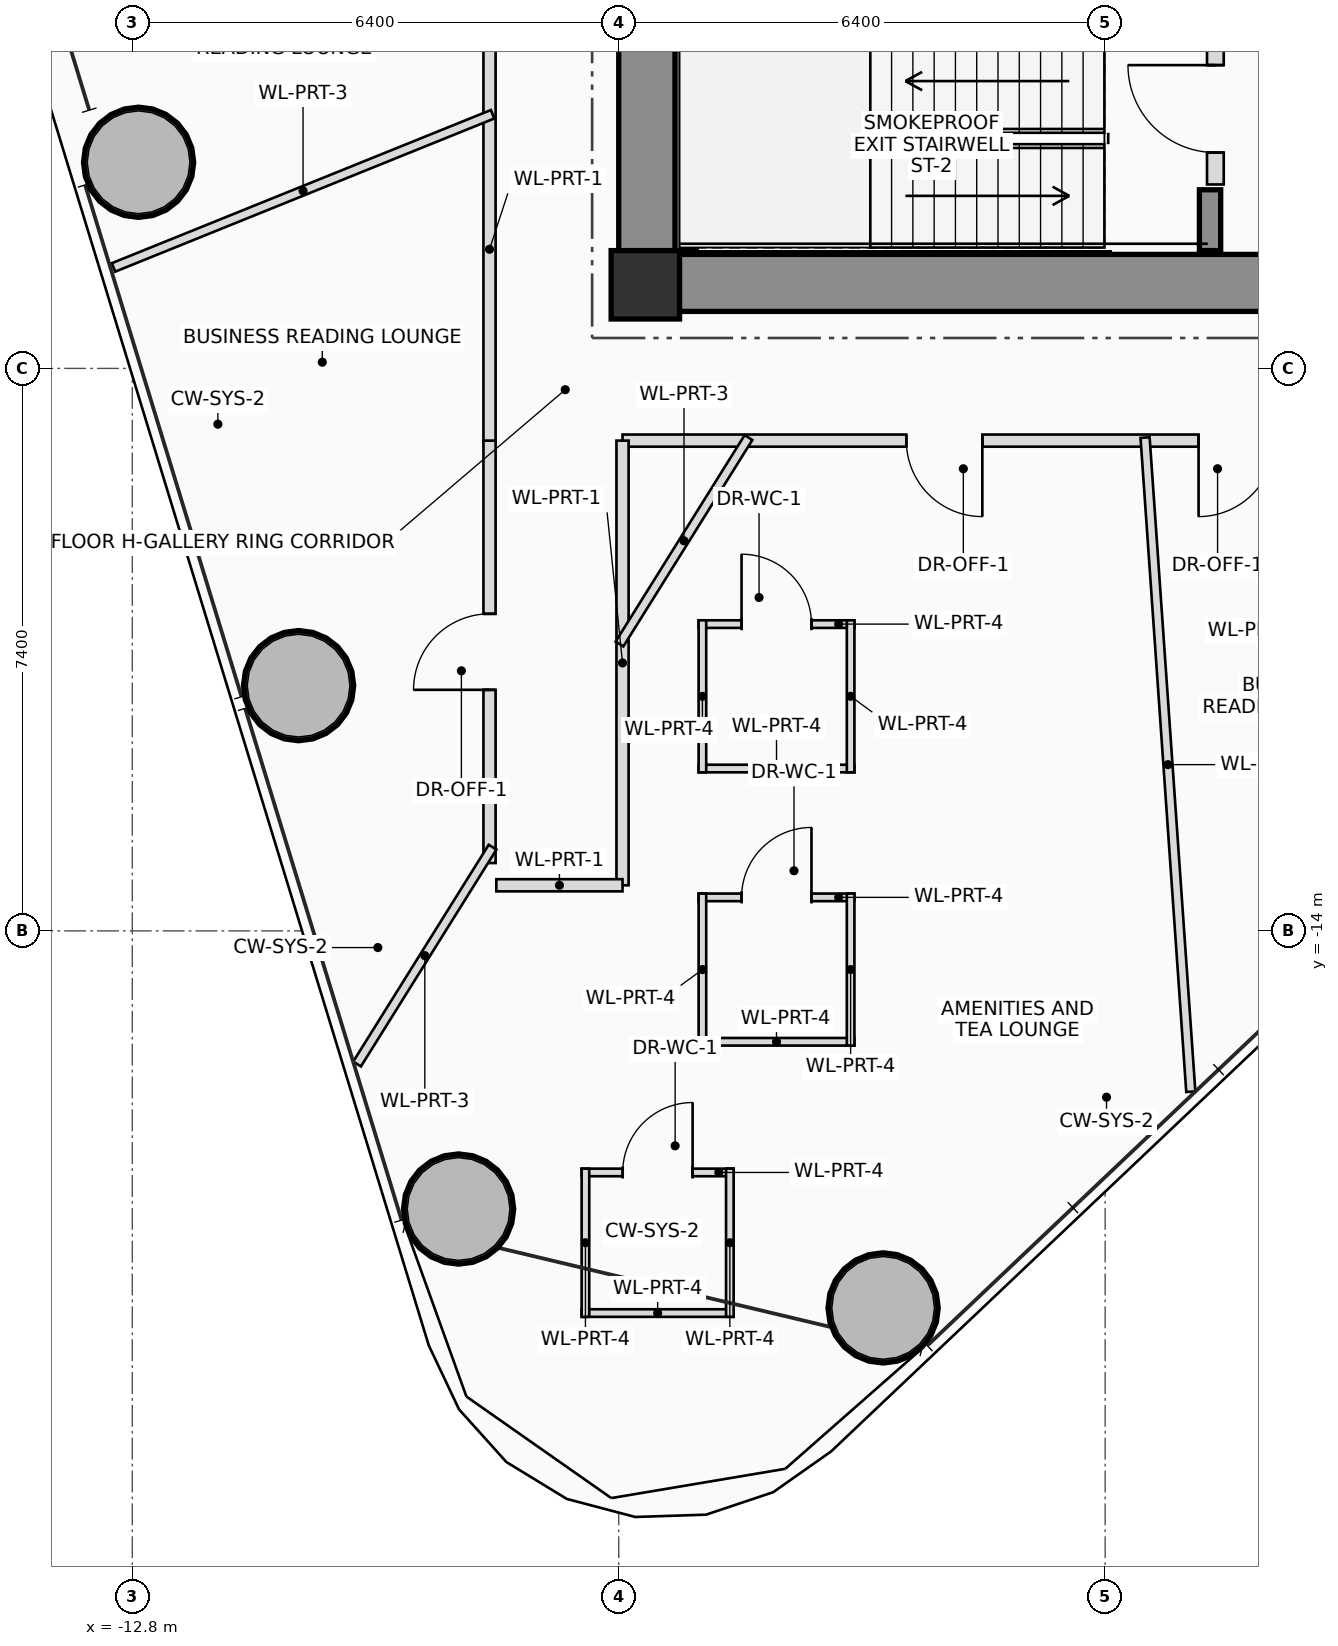
"""IFC4 building model, lengths in metres.
Left out: names, types, materials, properties, quantities, classifications, styles, units other than length and angle.
Written with IfcOpenShell. Run it as: python <this file> out.ifc"""

import sys

from ifc_helpers import new_model, si_unit, direction, frame, frame_2d, origin, origin_2d, place, context, subcontext, project, spatial, rectangle, hollow_circle, extrude, source, transform, mapped, element, fill, save


model = new_model("IFC4")
c1 = context("Model", 3, precision=1e-05, world=origin(), true_north=direction((0.0, 1.0)))
c2 = subcontext(c1, "Body", "Model", "MODEL_VIEW")
j1 = project(units=[si_unit("LENGTHUNIT", "METRE"), si_unit("PLANEANGLEUNIT", "RADIAN")], contexts=[c1])
p1 = place(None, origin())
s1 = spatial("IfcSite", under=j1, at=p1, CompositionType="ELEMENT")
p2 = place(p1, origin())
s2 = spatial("IfcBuilding", under=s1, at=p2, CompositionType="ELEMENT")
p3 = place(p2, frame((0.0, 0.0, 101.15)))
s3 = spatial("IfcBuildingStorey", under=s2, at=p3, CompositionType="ELEMENT", Elevation=101.15)
m1 = source(origin(), c2, "Body", "SweptSolid", [
    extrude(rectangle(XDim=0.9, YDim=0.9, at=origin_2d()), origin(), (0.0, 0.0, 1.0), 3.75),
])
p4 = place(p3, frame((-6.05, -5.5, 0.0), z_axis=(0.0, 0.0, 1.0), x_axis=(1.0, 0.0, 0.0)))
e1 = element("IfcColumn", 1, at=p4, inside=s3, PredefinedType="COLUMN", context=c2, shape_type="MappedRepresentation", body=[
    mapped(m1, transform((0.0, 0.0, 0.0), scale=1.0)),
])
p5 = place(p3, frame((-6.4, -5.475, 0.0), z_axis=(0.0, 0.0, 1.0), x_axis=(1.0, 0.0, 0.0)))
e2 = element("IfcWall", 2, at=p5, inside=s3, PredefinedType="SHEAR", context=c2, shape_type="SweptSolid", body=[
    extrude(rectangle(XDim=12.8, YDim=0.75, at=frame_2d((6.4, 0.0))), origin(), (0.0, 0.0, 1.0), 3.75),
])
p6 = place(p5, frame((8.6, 0.0, 0.0)))
e3 = element("IfcOpeningElement", 3, at=p6, cuts=e2, PredefinedType="OPENING", context=c2, shape_type="SweptSolid", body=[
    extrude(rectangle(XDim=1.2, YDim=2.2, at=frame_2d((0.6, 1.1))), frame((0.0, 0.385, 0.0), z_axis=(0.0, -1.0, 0.0), x_axis=(1.0, 0.0, 0.0)), (0.0, 0.0, 1.0), 0.77),
])
p7 = place(p3, frame((-6.025, -5.1, 0.0), z_axis=(0.0, 0.0, 1.0), x_axis=(0.0, 1.0, 0.0)))
e4 = element("IfcWall", 4, at=p7, inside=s3, PredefinedType="SHEAR", context=c2, shape_type="SweptSolid", body=[
    extrude(rectangle(XDim=3.35, YDim=0.75, at=frame_2d((1.675, 0.0))), origin(), (0.0, 0.0, 1.0), 3.75),
])
p8 = place(p3, frame((-5.52, -5.05, 0.0), z_axis=(0.0, 0.0, 1.0), x_axis=(0.0, 1.0, 0.0)))
e5 = element("IfcWall", 5, at=p8, inside=s3, PredefinedType="SHEAR", context=c2, shape_type="SweptSolid", body=[
    extrude(rectangle(XDim=2.75, YDim=0.28, at=frame_2d((1.375, 0.0))), origin(), (0.0, 0.0, 1.0), 3.75),
])
p9 = place(p3, frame((1.38, -5.05, 0.0), z_axis=(0.0, 0.0, 1.0), x_axis=(0.0, 1.0, 0.0)))
e6 = element("IfcWall", 6, at=p9, inside=s3, PredefinedType="SHEAR", context=c2, shape_type="SweptSolid", body=[
    extrude(rectangle(XDim=0.8, YDim=0.28, at=frame_2d((0.4, 0.0))), origin(), (0.0, 0.0, 1.0), 3.75),
])
m2 = source(origin(), c2, "Body", "SweptSolid", [
    extrude(hollow_circle(Radius=0.725, WallThickness=0.05, at=origin_2d()), origin(), (0.0, 0.0, 1.0), 3.75),
])
for number, where, z_axis, x_axis in (
    (7, (-2.921, -18.96, 0.0), (0.0, 0.0, 1.0), (1.0, 0.0, 0.0)),
    (8, (-12.717, -3.888, 0.0), (0.0, 0.0, 1.0), (1.0, 0.0, 0.0)),
    (9, (-10.612, -10.774, 0.0), (0.0, 0.0, 1.0), (1.0, 0.0, 0.0)),
    (10, (-8.507, -17.659, 0.0), (0.0, 0.0, 1.0), (1.0, 0.0, 0.0)),
):
    element("IfcColumn", number, at=place(p3, frame(where, z_axis=z_axis, x_axis=x_axis)), inside=s3, PredefinedType="COLUMN", context=c2, shape_type="MappedRepresentation", body=[
        mapped(m2, transform((0.0, 0.0, 0.0), scale=1.0)),
    ])
p10 = place(p3, frame((1.45, -4.18, 0.0), z_axis=(0.0, 0.0, 1.0), x_axis=(0.0, 1.0, 0.0)))
e11 = element("IfcWall", 11, at=p10, inside=s3, PredefinedType="PLUMBINGWALL", context=c2, shape_type="SweptSolid", body=[
    extrude(rectangle(XDim=1.98, YDim=0.22, at=frame_2d((0.99, 0.0))), origin(), (0.0, 0.0, 1.0), 3.545),
])
p11 = place(p10, frame((0.42, 0.0, 0.0)))
e12 = element("IfcOpeningElement", 12, at=p11, cuts=e11, PredefinedType="OPENING", context=c2, shape_type="SweptSolid", body=[
    extrude(rectangle(XDim=1.15, YDim=2.15, at=frame_2d((0.575, 1.075))), frame((0.0, 0.12, 0.0), z_axis=(0.0, -1.0, 0.0), x_axis=(1.0, 0.0, 0.0)), (0.0, 0.0, 1.0), 0.24),
])
p12 = place(p3, frame((-5.349, -13.559, 0.0), z_axis=(0.0, 0.0, 1.0), x_axis=(1.0, 0.0, 0.0)))
e13 = element("IfcWall", 13, at=p12, inside=s3, PredefinedType="PARTITIONING", context=c2, shape_type="SweptSolid", body=[
    extrude(rectangle(XDim=2.05, YDim=0.1, at=frame_2d((1.025, 0.0))), origin(), (0.0, 0.0, 1.0), 2.85),
])
p13 = place(p12, frame((0.565, 0.0, 0.0)))
e14 = element("IfcOpeningElement", 14, at=p13, cuts=e13, PredefinedType="OPENING", context=c2, shape_type="SweptSolid", body=[
    extrude(rectangle(XDim=0.92, YDim=2.1, at=frame_2d((0.46, 1.05))), frame((0.0, 0.06, 0.0), z_axis=(0.0, -1.0, 0.0), x_axis=(1.0, 0.0, 0.0)), (0.0, 0.0, 1.0), 0.12),
])
p14 = place(p3, frame((-3.299, -15.459, 0.0), z_axis=(0.0, 0.0, 1.0), x_axis=(-1.0, 0.0, 0.0)))
e15 = element("IfcWall", 15, at=p14, inside=s3, PredefinedType="PARTITIONING", context=c2, shape_type="SweptSolid", body=[
    extrude(rectangle(XDim=2.05, YDim=0.1, at=frame_2d((1.025, 0.0))), origin(), (0.0, 0.0, 1.0), 2.85),
])
for number, where, z_axis, x_axis in (
    (16, (-3.349, -13.509, 0.0), (0.0, 0.0, 1.0), (0.0, -1.0, 0.0)),
    (17, (-5.299, -15.509, 0.0), (0.0, 0.0, 1.0), (0.0, 1.0, 0.0)),
):
    element("IfcWall", number, at=place(p3, frame(where, z_axis=z_axis, x_axis=x_axis)), inside=s3, PredefinedType="PARTITIONING", context=c2, shape_type="SweptSolid", body=[
        extrude(rectangle(XDim=2.0, YDim=0.1, at=frame_2d((1.0, 0.0))), origin(), (0.0, 0.0, 1.0), 3.2),
    ])
p15 = place(p3, frame((-5.349, -9.964, 0.0), z_axis=(0.0, 0.0, 1.0), x_axis=(1.0, 0.0, 0.0)))
e18 = element("IfcWall", 18, at=p15, inside=s3, PredefinedType="PARTITIONING", context=c2, shape_type="SweptSolid", body=[
    extrude(rectangle(XDim=2.05, YDim=0.1, at=frame_2d((1.025, 0.0))), origin(), (0.0, 0.0, 1.0), 2.85),
])
p16 = place(p15, frame((0.565, 0.0, 0.0)))
e19 = element("IfcOpeningElement", 19, at=p16, cuts=e18, PredefinedType="OPENING", context=c2, shape_type="SweptSolid", body=[
    extrude(rectangle(XDim=0.92, YDim=2.1, at=frame_2d((0.46, 1.05))), frame((0.0, 0.06, 0.0), z_axis=(0.0, -1.0, 0.0), x_axis=(1.0, 0.0, 0.0)), (0.0, 0.0, 1.0), 0.12),
])
p17 = place(p3, frame((-3.299, -11.864, 0.0), z_axis=(0.0, 0.0, 1.0), x_axis=(-1.0, 0.0, 0.0)))
e20 = element("IfcWall", 20, at=p17, inside=s3, PredefinedType="PARTITIONING", context=c2, shape_type="SweptSolid", body=[
    extrude(rectangle(XDim=2.05, YDim=0.1, at=frame_2d((1.025, 0.0))), origin(), (0.0, 0.0, 1.0), 2.85),
])
for number, where, z_axis, x_axis in (
    (21, (-3.349, -9.914, 0.0), (0.0, 0.0, 1.0), (0.0, -1.0, 0.0)),
    (22, (-5.299, -11.914, 0.0), (0.0, 0.0, 1.0), (0.0, 1.0, 0.0)),
):
    element("IfcWall", number, at=place(p3, frame(where, z_axis=z_axis, x_axis=x_axis)), inside=s3, PredefinedType="PARTITIONING", context=c2, shape_type="SweptSolid", body=[
        extrude(rectangle(XDim=2.0, YDim=0.1, at=frame_2d((1.0, 0.0))), origin(), (0.0, 0.0, 1.0), 3.2),
    ])
p18 = place(p3, frame((-6.888, -17.178, 0.0), z_axis=(0.0, 0.0, 1.0), x_axis=(1.0, 0.0, 0.0)))
e23 = element("IfcWall", 23, at=p18, inside=s3, PredefinedType="PARTITIONING", context=c2, shape_type="SweptSolid", body=[
    extrude(rectangle(XDim=2.0, YDim=0.1, at=frame_2d((1.0, 0.0))), origin(), (0.0, 0.0, 1.0), 3.545),
])
p19 = place(p18, frame((0.54, 0.0, 0.0)))
e24 = element("IfcOpeningElement", 24, at=p19, cuts=e23, PredefinedType="OPENING", context=c2, shape_type="SweptSolid", body=[
    extrude(rectangle(XDim=0.92, YDim=2.1, at=frame_2d((0.46, 1.05))), frame((0.0, 0.06, 0.0), z_axis=(0.0, -1.0, 0.0), x_axis=(1.0, 0.0, 0.0)), (0.0, 0.0, 1.0), 0.12),
])
p20 = place(p3, frame((-4.888, -19.028, 0.0), z_axis=(0.0, 0.0, 1.0), x_axis=(-1.0, 0.0, 0.0)))
e25 = element("IfcWall", 25, at=p20, inside=s3, PredefinedType="PARTITIONING", context=c2, shape_type="SweptSolid", body=[
    extrude(rectangle(XDim=2.0, YDim=0.1, at=frame_2d((1.0, 0.0))), origin(), (0.0, 0.0, 1.0), 3.545),
])
for number, where, z_axis, x_axis in (
    (26, (-4.938, -17.128, 0.0), (0.0, 0.0, 1.0), (0.0, -1.0, 0.0)),
    (27, (-6.838, -19.078, 0.0), (0.0, 0.0, 1.0), (0.0, 1.0, 0.0)),
):
    element("IfcWall", number, at=place(p3, frame(where, z_axis=z_axis, x_axis=x_axis)), inside=s3, PredefinedType="PARTITIONING", context=c2, shape_type="SweptSolid", body=[
        extrude(rectangle(XDim=1.95, YDim=0.1, at=frame_2d((0.975, 0.0))), origin(), (0.0, 0.0, 1.0), 3.01),
    ])
p21 = place(p3, frame((-8.1, -13.107, 0.0), z_axis=(0.0, 0.0, 1.0), x_axis=(0.0, 1.0, 0.0)))
e28 = element("IfcWall", 28, at=p21, inside=s3, PredefinedType="PARTITIONING", context=c2, shape_type="SweptSolid", body=[
    extrude(rectangle(XDim=5.557, YDim=0.16, at=frame_2d((2.779, 0.0))), origin(), (0.0, 0.0, 1.0), 2.85),
])
p22 = place(p21, frame((2.279, 0.0, 0.0)))
e29 = element("IfcOpeningElement", 29, at=p22, cuts=e28, PredefinedType="OPENING", context=c2, shape_type="SweptSolid", body=[
    extrude(rectangle(XDim=1.0, YDim=2.25, at=frame_2d((0.5, 1.125))), frame((0.0, 0.09, 0.0), z_axis=(0.0, -1.0, 0.0), x_axis=(1.0, 0.0, 0.0)), (0.0, 0.0, 1.0), 0.18),
])
p23 = place(p3, frame((-8.1, -7.55, 0.0), z_axis=(0.0, 0.0, 1.0), x_axis=(0.0, 1.0, 0.0)))
e30 = element("IfcWall", 30, at=p23, inside=s3, PredefinedType="PARTITIONING", context=c2, shape_type="SweptSolid", body=[
    extrude(rectangle(XDim=15.1, YDim=0.16, at=frame_2d((7.55, 0.0))), origin(), (0.0, 0.0, 1.0), 2.85),
])
p24 = place(p23, frame((5.185, 0.0, 0.0)))
e31 = element("IfcOpeningElement", 31, at=p24, cuts=e30, PredefinedType="OPENING", context=c2, shape_type="SweptSolid", body=[
    extrude(rectangle(XDim=1.0, YDim=2.25, at=frame_2d((0.5, 1.125))), frame((0.0, 0.09, 0.0), z_axis=(0.0, -1.0, 0.0), x_axis=(1.0, 0.0, 0.0)), (0.0, 0.0, 1.0), 0.18),
])
p25 = place(p23, frame((9.39, 0.0, 0.0)))
e32 = element("IfcOpeningElement", 32, at=p25, cuts=e30, PredefinedType="OPENING", context=c2, shape_type="SweptSolid", body=[
    extrude(rectangle(XDim=1.0, YDim=2.25, at=frame_2d((0.5, 1.125))), frame((0.0, 0.09, 0.0), z_axis=(0.0, -1.0, 0.0), x_axis=(1.0, 0.0, 0.0)), (0.0, 0.0, 1.0), 0.18),
])
p26 = place(p23, frame((13.607, 0.0, 0.0)))
e33 = element("IfcOpeningElement", 33, at=p26, cuts=e30, PredefinedType="OPENING", context=c2, shape_type="SweptSolid", body=[
    extrude(rectangle(XDim=1.0, YDim=2.25, at=frame_2d((0.5, 1.125))), frame((0.0, 0.09, 0.0), z_axis=(0.0, -1.0, 0.0), x_axis=(1.0, 0.0, 0.0)), (0.0, 0.0, 1.0), 0.18),
])
p27 = place(p3, frame((6.35, -7.55, 0.0), z_axis=(0.0, 0.0, 1.0), x_axis=(-1.0, 0.0, 0.0)))
e34 = element("IfcWall", 34, at=p27, inside=s3, PredefinedType="PARTITIONING", context=c2, shape_type="SweptSolid", body=[
    extrude(rectangle(XDim=12.7, YDim=0.16, at=frame_2d((6.35, 0.0))), origin(), (0.0, 0.0, 1.0), 2.85),
])
p28 = place(p27, frame((4.121, 0.0, 0.0)))
e35 = element("IfcOpeningElement", 35, at=p28, cuts=e34, PredefinedType="OPENING", context=c2, shape_type="SweptSolid", body=[
    extrude(rectangle(XDim=1.0, YDim=2.25, at=frame_2d((0.5, 1.125))), frame((0.0, 0.09, 0.0), z_axis=(0.0, -1.0, 0.0), x_axis=(1.0, 0.0, 0.0)), (0.0, 0.0, 1.0), 0.18),
])
p29 = place(p27, frame((7.966, 0.0, 0.0)))
e36 = element("IfcOpeningElement", 36, at=p29, cuts=e34, PredefinedType="OPENING", context=c2, shape_type="SweptSolid", body=[
    extrude(rectangle(XDim=1.0, YDim=2.25, at=frame_2d((0.5, 1.125))), frame((0.0, 0.09, 0.0), z_axis=(0.0, -1.0, 0.0), x_axis=(1.0, 0.0, 0.0)), (0.0, 0.0, 1.0), 0.18),
])
p30 = place(p3, frame((-6.35, -7.55, 0.0), z_axis=(0.0, 0.0, 1.0), x_axis=(0.0, -1.0, 0.0)))
e37 = element("IfcWall", 37, at=p30, inside=s3, PredefinedType="PARTITIONING", context=c2, shape_type="SweptSolid", body=[
    extrude(rectangle(XDim=5.85, YDim=0.16, at=frame_2d((2.925, 0.0))), origin(), (0.0, 0.0, 1.0), 2.85),
])
p31 = place(p3, frame((-6.35, -13.4, 0.0), z_axis=(0.0, 0.0, 1.0), x_axis=(-1.0, 0.0, 0.0)))
e38 = element("IfcWall", 38, at=p31, inside=s3, PredefinedType="PARTITIONING", context=c2, shape_type="SweptSolid", body=[
    extrude(rectangle(XDim=1.66, YDim=0.16, at=frame_2d((0.83, 0.0))), origin(), (0.0, 0.0, 1.0), 2.85),
])
p32 = place(p3, frame((-8.06, -3.257, 0.0), z_axis=(0.0, 0.0, 1.0), x_axis=(-0.927184543748, -0.374604887627, 0.0)))
e39 = element("IfcWall", 39, at=p32, inside=s3, PredefinedType="PARTITIONING", context=c2, shape_type="SweptSolid", body=[
    extrude(rectangle(XDim=5.379, YDim=0.12, at=frame_2d((2.689, 0.0))), origin(), (0.0, 0.0, 1.0), 2.85),
])
p33 = place(p3, frame((-4.693, -7.51, 0.0), z_axis=(0.0, 0.0, 1.0), x_axis=(-0.529882447014, -0.848071100997, 0.0)))
e40 = element("IfcWall", 40, at=p33, inside=s3, PredefinedType="PARTITIONING", context=c2, shape_type="SweptSolid", body=[
    extrude(rectangle(XDim=3.203, YDim=0.12, at=frame_2d((1.601, 0.0))), origin(), (0.0, 0.0, 1.0), 2.85),
])
p34 = place(p3, frame((-8.06, -12.899, 0.0), z_axis=(0.0, 0.0, 1.0), x_axis=(-0.529927190475, -0.84804314324, 0.0)))
e41 = element("IfcWall", 41, at=p34, inside=s3, PredefinedType="PARTITIONING", context=c2, shape_type="SweptSolid", body=[
    extrude(rectangle(XDim=3.365, YDim=0.12, at=frame_2d((1.682, 0.0))), origin(), (0.0, 0.0, 1.0), 3.01),
])
p35 = place(p3, frame((0.525, -7.51, 0.0), z_axis=(0.0, 0.0, 1.0), x_axis=(0.069760692691, -0.997563755233, 0.0)))
e42 = element("IfcWall", 42, at=p35, inside=s3, PredefinedType="PARTITIONING", context=c2, shape_type="SweptSolid", body=[
    extrude(rectangle(XDim=8.627, YDim=0.12, at=frame_2d((4.313, 0.0))), origin(), (0.0, 0.0, 1.0), 3.01),
])
p36 = place(p11, origin())
e43 = element("IfcDoor", 43, at=p36, inside=s3, OperationType="SINGLE_SWING_RIGHT", PredefinedType="DOOR", context=c2, shape_type="SweptSolid", body=[
    extrude(rectangle(XDim=1.15, YDim=2.15, at=frame_2d((0.575, 1.075))), frame((0.0, 0.025, 0.0), z_axis=(0.0, -1.0, 0.0), x_axis=(1.0, 0.0, 0.0)), (0.0, 0.0, 1.0), 0.05),
])
fill(e12, e43)
p37 = place(p13, origin())
e44 = element("IfcDoor", 44, at=p37, inside=s3, OperationType="SINGLE_SWING_RIGHT", PredefinedType="DOOR", context=c2, shape_type="SweptSolid", body=[
    extrude(rectangle(XDim=0.92, YDim=2.1, at=frame_2d((0.46, 1.05))), frame((0.0, 0.025, 0.0), z_axis=(0.0, -1.0, 0.0), x_axis=(1.0, 0.0, 0.0)), (0.0, 0.0, 1.0), 0.05),
])
fill(e14, e44)
p38 = place(p16, origin())
e45 = element("IfcDoor", 45, at=p38, inside=s3, OperationType="SINGLE_SWING_LEFT", PredefinedType="DOOR", context=c2, shape_type="SweptSolid", body=[
    extrude(rectangle(XDim=0.92, YDim=2.1, at=frame_2d((0.46, 1.05))), frame((0.0, 0.025, 0.0), z_axis=(0.0, -1.0, 0.0), x_axis=(1.0, 0.0, 0.0)), (0.0, 0.0, 1.0), 0.05),
])
fill(e19, e45)
p39 = place(p19, origin())
e46 = element("IfcDoor", 46, at=p39, inside=s3, OperationType="SINGLE_SWING_RIGHT", PredefinedType="DOOR", context=c2, shape_type="SweptSolid", body=[
    extrude(rectangle(XDim=0.92, YDim=2.1, at=frame_2d((0.46, 1.05))), frame((0.0, 0.025, 0.0), z_axis=(0.0, -1.0, 0.0), x_axis=(1.0, 0.0, 0.0)), (0.0, 0.0, 1.0), 0.05),
])
fill(e24, e46)
p40 = place(p22, origin())
e47 = element("IfcDoor", 47, at=p40, inside=s3, OperationType="SINGLE_SWING_LEFT", PredefinedType="DOOR", context=c2, shape_type="SweptSolid", body=[
    extrude(rectangle(XDim=1.0, YDim=2.25, at=frame_2d((0.5, 1.125))), frame((0.0, 0.025, 0.0), z_axis=(0.0, -1.0, 0.0), x_axis=(1.0, 0.0, 0.0)), (0.0, 0.0, 1.0), 0.05),
])
fill(e29, e47)
p41 = place(p28, origin())
e48 = element("IfcDoor", 48, at=p41, inside=s3, OperationType="SINGLE_SWING_RIGHT", PredefinedType="DOOR", context=c2, shape_type="SweptSolid", body=[
    extrude(rectangle(XDim=1.0, YDim=2.25, at=frame_2d((0.5, 1.125))), frame((0.0, 0.025, 0.0), z_axis=(0.0, -1.0, 0.0), x_axis=(1.0, 0.0, 0.0)), (0.0, 0.0, 1.0), 0.05),
])
fill(e35, e48)
p42 = place(p29, origin())
e49 = element("IfcDoor", 49, at=p42, inside=s3, OperationType="SINGLE_SWING_LEFT", PredefinedType="DOOR", context=c2, shape_type="SweptSolid", body=[
    extrude(rectangle(XDim=1.0, YDim=2.25, at=frame_2d((0.5, 1.125))), frame((0.0, 0.025, 0.0), z_axis=(0.0, -1.0, 0.0), x_axis=(1.0, 0.0, 0.0)), (0.0, 0.0, 1.0), 0.05),
])
fill(e36, e49)
save(model, sys.argv[1])
